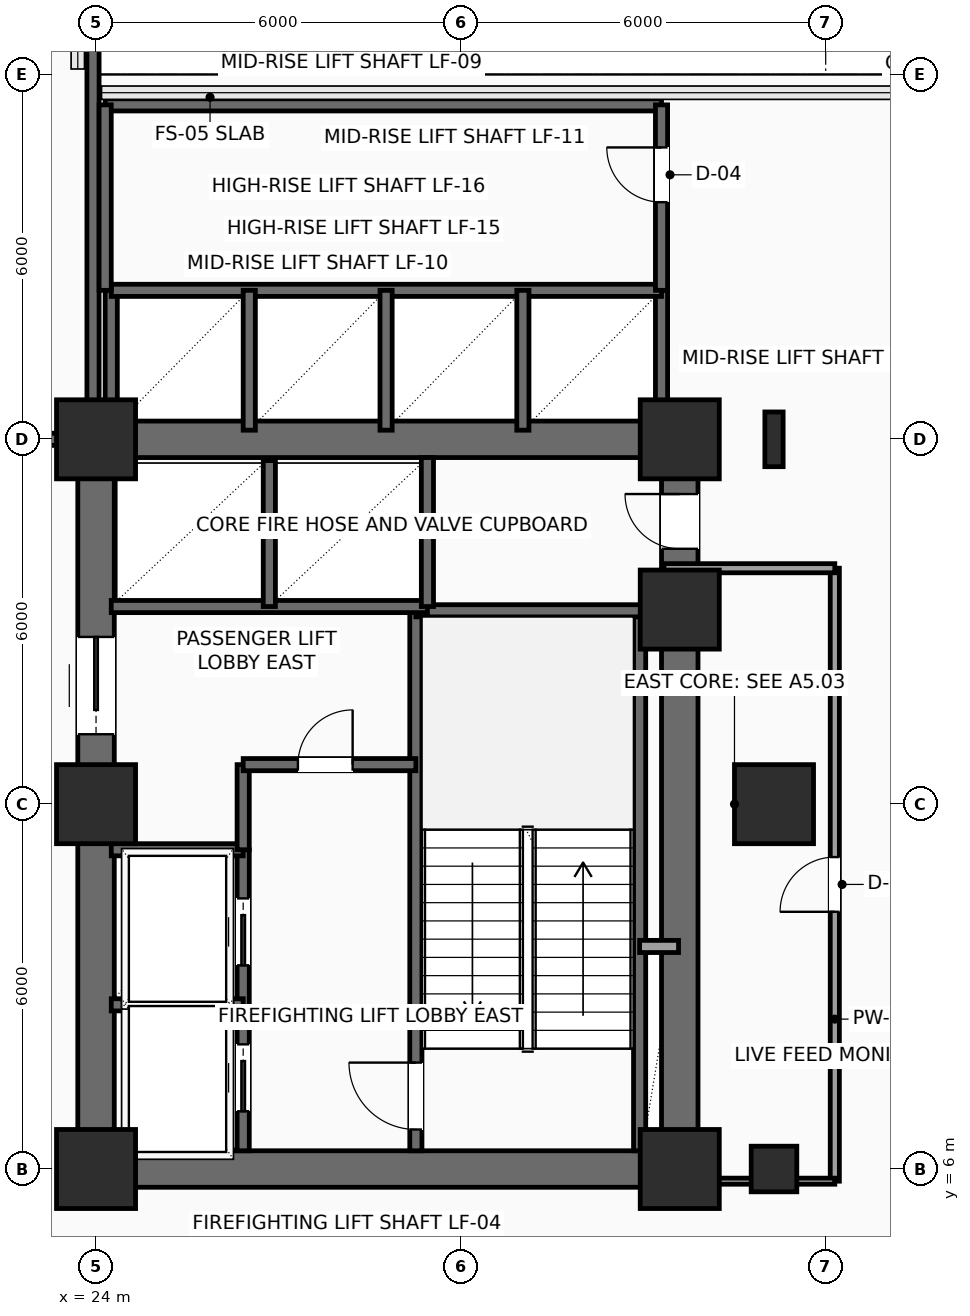
"""IFC4 building model, lengths in metres.
Left out: names, types, materials, properties, quantities, classifications, styles, units other than length and angle.
Written with IfcOpenShell. Run it as: python <this file> out.ifc"""

import sys

from ifc_helpers import new_model, si_unit, direction, frame, frame_2d, origin, origin_2d, place, context, subcontext, project, spatial, rectangle, hollow_rectangle, i_section, extrude, element, fill, save


model = new_model("IFC4")
c1 = context("Model", 3, precision=1e-05, world=origin(), true_north=direction((0.0, 1.0)))
c2 = subcontext(c1, "Body", "Model", "MODEL_VIEW")
j1 = project(units=[si_unit("LENGTHUNIT", "METRE"), si_unit("PLANEANGLEUNIT", "RADIAN")], contexts=[c1])
p1 = place(None, origin())
s1 = spatial("IfcSite", under=j1, at=p1, CompositionType="ELEMENT")
p2 = place(p1, origin())
s2 = spatial("IfcBuilding", under=s1, at=p2, CompositionType="ELEMENT")
p3 = place(p2, frame((0.0, 0.0, 40.2)))
s3 = spatial("IfcBuildingStorey", under=s2, at=p3, CompositionType="ELEMENT", Elevation=40.2)
for number, where, z_axis, x_axis in (
    (1, (24.0, 6.0, 0.0), (0.0, 0.0, 1.0), (1.0, 0.0, 0.0)),
    (2, (24.0, 12.0, 0.0), (0.0, 0.0, 1.0), (1.0, 0.0, 0.0)),
    (3, (24.0, 18.0, 0.0), (0.0, 0.0, 1.0), (1.0, 0.0, 0.0)),
    (4, (33.6, 6.0, 0.0), (0.0, 0.0, 1.0), (1.0, 0.0, 0.0)),
    (5, (33.6, 15.2, 0.0), (0.0, 0.0, 1.0), (1.0, 0.0, 0.0)),
    (6, (33.6, 18.0, 0.0), (0.0, 0.0, 1.0), (1.0, 0.0, 0.0)),
):
    element("IfcColumn", number, at=place(p3, frame(where, z_axis=z_axis, x_axis=x_axis)), inside=s3, PredefinedType="COLUMN", context=c2, shape_type="SweptSolid", body=[
        extrude(rectangle(XDim=1.3, YDim=1.3, at=origin_2d()), origin(), (0.0, 0.0, 1.0), 3.9),
    ])
p4 = place(p3, frame((35.15, 6.0, 0.0), z_axis=(0.0, 0.0, 1.0), x_axis=(1.0, 0.0, 0.0)))
e7 = element("IfcColumn", 7, at=p4, inside=s3, PredefinedType="COLUMN", context=c2, shape_type="SweptSolid", body=[
    extrude(hollow_rectangle(XDim=0.75, YDim=0.75, WallThickness=0.035, InnerFilletRadius=0.035, OuterFilletRadius=0.05, at=origin_2d()), origin(), (0.0, 0.0, 1.0), 3.9),
])
p5 = place(p3, frame((35.15, 12.0, 0.0), z_axis=(0.0, 0.0, 1.0), x_axis=(1.0, 0.0, 0.0)))
e8 = element("IfcColumn", 8, at=p5, inside=s3, PredefinedType="COLUMN", context=c2, shape_type="SweptSolid", body=[
    extrude(rectangle(XDim=1.3, YDim=1.3, at=origin_2d()), origin(), (0.0, 0.0, 1.0), 3.9),
])
p6 = place(p3, frame((35.15, 18.0, 0.0), z_axis=(0.0, 0.0, 1.0), x_axis=(1.0, 0.0, 0.0)))
e9 = element("IfcColumn", 9, at=p6, inside=s3, PredefinedType="COLUMN", context=c2, shape_type="SweptSolid", body=[
    extrude(i_section(OverallWidth=0.3, OverallDepth=0.9, WebThickness=0.019, FlangeThickness=0.035, FilletRadius=0.03, at=origin_2d()), origin(), (0.0, 0.0, 1.0), 3.9),
])
for number, where, z_axis, x_axis in (
    (10, (24.0, 6.0, 0.0), (0.0, 0.0, 1.0), (1.0, 0.0, 0.0)),
    (11, (24.0, 18.0, 0.0), (0.0, 0.0, 1.0), (1.0, 0.0, 0.0)),
):
    element("IfcWall", number, at=place(p3, frame(where, z_axis=z_axis, x_axis=x_axis)), inside=s3, PredefinedType="SHEAR", context=c2, shape_type="SweptSolid", body=[
        extrude(rectangle(XDim=9.6, YDim=0.6, at=frame_2d((4.8, 0.0))), origin(), (0.0, 0.0, 1.0), 3.65),
    ])
p7 = place(p3, frame((24.0, 6.0, 0.0), z_axis=(0.0, 0.0, 1.0), x_axis=(0.0, 1.0, 0.0)))
e12 = element("IfcWall", 12, at=p7, inside=s3, PredefinedType="SHEAR", context=c2, shape_type="SweptSolid", body=[
    extrude(rectangle(XDim=12.0, YDim=0.6, at=frame_2d((6.0, 0.0))), origin(), (0.0, 0.0, 1.0), 3.65),
])
p8 = place(p7, frame((7.15, 0.0, 0.0)))
e13 = element("IfcOpeningElement", 13, at=p8, cuts=e12, PredefinedType="OPENING", context=c2, shape_type="SweptSolid", body=[
    extrude(rectangle(XDim=1.6, YDim=2.3, at=frame_2d((0.8, 1.15))), frame((0.0, 0.31, 0.0), z_axis=(0.0, -1.0, 0.0), x_axis=(1.0, 0.0, 0.0)), (0.0, 0.0, 1.0), 0.62),
])
p9 = place(p3, frame((33.6, 6.0, 0.0), z_axis=(0.0, 0.0, 1.0), x_axis=(0.0, 1.0, 0.0)))
e14 = element("IfcWall", 14, at=p9, inside=s3, PredefinedType="SHEAR", context=c2, shape_type="SweptSolid", body=[
    extrude(rectangle(XDim=12.0, YDim=0.6, at=frame_2d((6.0, 0.0))), origin(), (0.0, 0.0, 1.0), 3.65),
])
p10 = place(p9, frame((10.2, 0.0, 0.0)))
e15 = element("IfcOpeningElement", 15, at=p10, cuts=e14, PredefinedType="OPENING", context=c2, shape_type="SweptSolid", body=[
    extrude(rectangle(XDim=0.9, YDim=2.15, at=frame_2d((0.45, 1.075))), frame((0.0, 0.31, 0.0), z_axis=(0.0, -1.0, 0.0), x_axis=(1.0, 0.0, 0.0)), (0.0, 0.0, 1.0), 0.62),
])
p11 = place(p3, frame((29.26, 6.3, 0.0), z_axis=(0.0, 0.0, 1.0), x_axis=(0.0, 1.0, 0.0)))
e16 = element("IfcWall", 16, at=p11, inside=s3, PredefinedType="SHEAR", context=c2, shape_type="SweptSolid", body=[
    extrude(rectangle(XDim=8.88, YDim=0.2, at=frame_2d((4.44, 0.0))), origin(), (0.0, 0.0, 1.0), 3.65),
])
p12 = place(p11, frame((0.35, 0.0, 0.0)))
e17 = element("IfcOpeningElement", 17, at=p12, cuts=e16, PredefinedType="OPENING", context=c2, shape_type="SweptSolid", body=[
    extrude(rectangle(XDim=1.1, YDim=2.2, at=frame_2d((0.55, 1.1))), frame((0.0, 0.11, 0.0), z_axis=(0.0, -1.0, 0.0), x_axis=(1.0, 0.0, 0.0)), (0.0, 0.0, 1.0), 0.22),
])
p13 = place(p3, frame((32.94, 6.3, 0.0), z_axis=(0.0, 0.0, 1.0), x_axis=(0.0, 1.0, 0.0)))
e18 = element("IfcWall", 18, at=p13, inside=s3, PredefinedType="SHEAR", context=c2, shape_type="SweptSolid", body=[
    extrude(rectangle(XDim=8.88, YDim=0.2, at=frame_2d((4.44, 0.0))), origin(), (0.0, 0.0, 1.0), 3.65),
])
p14 = place(p3, frame((29.26, 15.18, 0.0), z_axis=(0.0, 0.0, 1.0), x_axis=(1.0, 0.0, 0.0)))
e19 = element("IfcWall", 19, at=p14, inside=s3, PredefinedType="SHEAR", context=c2, shape_type="SweptSolid", body=[
    extrude(rectangle(XDim=4.04, YDim=0.2, at=frame_2d((2.02, 0.0))), origin(), (0.0, 0.0, 1.0), 3.65),
])
p15 = place(p3, frame((26.42, 6.3, 0.0), z_axis=(0.0, 0.0, 1.0), x_axis=(0.0, 1.0, 0.0)))
e20 = element("IfcWall", 20, at=p15, inside=s3, PredefinedType="SHEAR", context=c2, shape_type="SweptSolid", body=[
    extrude(rectangle(XDim=4.95, YDim=0.2, at=frame_2d((2.475, 0.0))), origin(), (0.0, 0.0, 1.0), 3.65),
])
p16 = place(p15, frame((0.65, 0.0, 0.0)))
e21 = element("IfcOpeningElement", 21, at=p16, cuts=e20, PredefinedType="OPENING", context=c2, shape_type="SweptSolid", body=[
    extrude(rectangle(XDim=1.1, YDim=2.2, at=frame_2d((0.55, 1.1))), frame((0.0, 0.11, 0.0), z_axis=(0.0, -1.0, 0.0), x_axis=(1.0, 0.0, 0.0)), (0.0, 0.0, 1.0), 0.22),
])
p17 = place(p15, frame((3.05, 0.0, 0.0)))
e22 = element("IfcOpeningElement", 22, at=p17, cuts=e20, PredefinedType="OPENING", context=c2, shape_type="SweptSolid", body=[
    extrude(rectangle(XDim=1.1, YDim=2.2, at=frame_2d((0.55, 1.1))), frame((0.0, 0.11, 0.0), z_axis=(0.0, -1.0, 0.0), x_axis=(1.0, 0.0, 0.0)), (0.0, 0.0, 1.0), 0.22),
])
for number, where, z_axis, x_axis in (
    (23, (24.25, 8.7, 0.0), (0.0, 0.0, 1.0), (1.0, 0.0, 0.0)),
    (24, (24.25, 11.25, 0.0), (0.0, 0.0, 1.0), (1.0, 0.0, 0.0)),
):
    element("IfcWall", number, at=place(p3, frame(where, z_axis=z_axis, x_axis=x_axis)), inside=s3, PredefinedType="SHEAR", context=c2, shape_type="SweptSolid", body=[
        extrude(rectangle(XDim=2.17, YDim=0.2, at=frame_2d((1.085, 0.0))), origin(), (0.0, 0.0, 1.0), 3.65),
    ])
p18 = place(p3, frame((26.42, 11.25, 0.0), z_axis=(0.0, 0.0, 1.0), x_axis=(0.0, 1.0, 0.0)))
e25 = element("IfcWall", 25, at=p18, inside=s3, PredefinedType="SHEAR", context=c2, shape_type="SweptSolid", body=[
    extrude(rectangle(XDim=1.4, YDim=0.2, at=frame_2d((0.7, 0.0))), origin(), (0.0, 0.0, 1.0), 3.65),
])
p19 = place(p3, frame((26.42, 12.65, 0.0), z_axis=(0.0, 0.0, 1.0), x_axis=(1.0, 0.0, 0.0)))
e26 = element("IfcWall", 26, at=p19, inside=s3, PredefinedType="SHEAR", context=c2, shape_type="SweptSolid", body=[
    extrude(rectangle(XDim=2.84, YDim=0.2, at=frame_2d((1.42, 0.0))), origin(), (0.0, 0.0, 1.0), 3.65),
])
p20 = place(p19, frame((0.9, 0.0, 0.0)))
e27 = element("IfcOpeningElement", 27, at=p20, cuts=e26, PredefinedType="OPENING", context=c2, shape_type="SweptSolid", body=[
    extrude(rectangle(XDim=0.9, YDim=2.15, at=frame_2d((0.45, 1.075))), frame((0.0, 0.11, 0.0), z_axis=(0.0, -1.0, 0.0), x_axis=(1.0, 0.0, 0.0)), (0.0, 0.0, 1.0), 0.22),
])
p21 = place(p3, frame((32.94, 9.66, 0.0), z_axis=(0.0, 0.0, 1.0), x_axis=(1.0, 0.0, 0.0)))
e28 = element("IfcWall", 28, at=p21, inside=s3, PredefinedType="SOLIDWALL", context=c2, shape_type="SweptSolid", body=[
    extrude(rectangle(XDim=0.64, YDim=0.2, at=frame_2d((0.32, 0.0))), origin(), (0.0, 0.0, 1.0), 3.65),
])
p22 = place(p3, frame((24.25, 15.25, 0.0), z_axis=(0.0, 0.0, 1.0), x_axis=(1.0, 0.0, 0.0)))
e29 = element("IfcWall", 29, at=p22, inside=s3, PredefinedType="SHEAR", context=c2, shape_type="SweptSolid", body=[
    extrude(rectangle(XDim=5.2, YDim=0.2, at=frame_2d((2.6, 0.0))), origin(), (0.0, 0.0, 1.0), 3.65),
])
p23 = place(p3, frame((26.85, 15.25, 0.0), z_axis=(0.0, 0.0, 1.0), x_axis=(0.0, 1.0, 0.0)))
e30 = element("IfcWall", 30, at=p23, inside=s3, PredefinedType="SHEAR", context=c2, shape_type="SweptSolid", body=[
    extrude(rectangle(XDim=2.4, YDim=0.2, at=frame_2d((1.2, 0.0))), origin(), (0.0, 0.0, 1.0), 3.65),
])
p24 = place(p3, frame((29.45, 15.25, 0.0), z_axis=(0.0, 0.0, 1.0), x_axis=(0.0, 1.0, 0.0)))
e31 = element("IfcWall", 31, at=p24, inside=s3, PredefinedType="SHEAR", context=c2, shape_type="SweptSolid", body=[
    extrude(rectangle(XDim=2.45, YDim=0.2, at=frame_2d((1.225, 0.0))), origin(), (0.0, 0.0, 1.0), 3.65),
])
p25 = place(p3, frame((20.45, 18.0, 0.0), z_axis=(0.0, 0.0, 1.0), x_axis=(1.0, 0.0, 0.0)))
e32 = element("IfcWall", 32, at=p25, inside=s3, PredefinedType="SHEAR", context=c2, shape_type="SweptSolid", body=[
    extrude(rectangle(XDim=3.5, YDim=0.2, at=frame_2d((1.75, 0.0))), origin(), (0.0, 0.0, 1.0), 3.65),
])
p26 = place(p25, frame((0.95, 0.0, 0.0)))
e33 = element("IfcOpeningElement", 33, at=p26, cuts=e32, PredefinedType="OPENING", context=c2, shape_type="SweptSolid", body=[
    extrude(rectangle(XDim=1.6, YDim=2.3, at=frame_2d((0.8, 1.15))), frame((0.0, 0.11, 0.0), z_axis=(0.0, -1.0, 0.0), x_axis=(1.0, 0.0, 0.0)), (0.0, 0.0, 1.0), 0.22),
])
p27 = place(p3, frame((23.95, 18.0, 0.0), z_axis=(0.0, 0.0, 1.0), x_axis=(0.0, 1.0, 0.0)))
e34 = element("IfcWall", 34, at=p27, inside=s3, PredefinedType="SHEAR", context=c2, shape_type="SweptSolid", body=[
    extrude(rectangle(XDim=9.3, YDim=0.2, at=frame_2d((4.65, 0.0))), origin(), (0.0, 0.0, 1.0), 3.65),
])
for number, where, z_axis, x_axis in (
    (35, (33.3, 18.1, 0.0), (0.0, 0.0, 1.0), (0.0, 1.0, 0.0)),
    (36, (24.25, 18.1, 0.0), (0.0, 0.0, 1.0), (0.0, 1.0, 0.0)),
):
    element("IfcWall", number, at=place(p3, frame(where, z_axis=z_axis, x_axis=x_axis)), inside=s3, PredefinedType="SHEAR", context=c2, shape_type="SweptSolid", body=[
        extrude(rectangle(XDim=2.35, YDim=0.2, at=frame_2d((1.175, 0.0))), origin(), (0.0, 0.0, 1.0), 3.65),
    ])
p28 = place(p3, frame((24.25, 20.45, 0.0), z_axis=(0.0, 0.0, 1.0), x_axis=(1.0, 0.0, 0.0)))
e37 = element("IfcWall", 37, at=p28, inside=s3, PredefinedType="SHEAR", context=c2, shape_type="SweptSolid", body=[
    extrude(rectangle(XDim=9.05, YDim=0.2, at=frame_2d((4.525, 0.0))), origin(), (0.0, 0.0, 1.0), 3.65),
])
for number, where, z_axis, x_axis in (
    (38, (26.52, 18.15, 0.0), (0.0, 0.0, 1.0), (0.0, 1.0, 0.0)),
    (39, (28.77, 18.15, 0.0), (0.0, 0.0, 1.0), (0.0, 1.0, 0.0)),
    (40, (31.02, 18.15, 0.0), (0.0, 0.0, 1.0), (0.0, 1.0, 0.0)),
):
    element("IfcWall", number, at=place(p3, frame(where, z_axis=z_axis, x_axis=x_axis)), inside=s3, PredefinedType="SHEAR", context=c2, shape_type="SweptSolid", body=[
        extrude(rectangle(XDim=2.3, YDim=0.2, at=frame_2d((1.15, 0.0))), origin(), (0.0, 0.0, 1.0), 3.65),
    ])
p29 = place(p3, frame((24.15, 23.5, 0.0), z_axis=(0.0, 0.0, 1.0), x_axis=(1.0, 0.0, 0.0)))
e41 = element("IfcWall", 41, at=p29, inside=s3, PredefinedType="SHEAR", context=c2, shape_type="SweptSolid", body=[
    extrude(rectangle(XDim=9.15, YDim=0.2, at=frame_2d((4.575, 0.0))), origin(), (0.0, 0.0, 1.0), 3.65),
])
p30 = place(p3, frame((33.3, 20.45, 0.0), z_axis=(0.0, 0.0, 1.0), x_axis=(0.0, 1.0, 0.0)))
e42 = element("IfcWall", 42, at=p30, inside=s3, PredefinedType="SHEAR", context=c2, shape_type="SweptSolid", body=[
    extrude(rectangle(XDim=3.05, YDim=0.2, at=frame_2d((1.525, 0.0))), origin(), (0.0, 0.0, 1.0), 3.65),
])
p31 = place(p30, frame((1.45, 0.0, 0.0)))
e43 = element("IfcOpeningElement", 43, at=p31, cuts=e42, PredefinedType="OPENING", context=c2, shape_type="SweptSolid", body=[
    extrude(rectangle(XDim=0.9, YDim=2.15, at=frame_2d((0.45, 1.075))), frame((0.0, 0.11, 0.0), z_axis=(0.0, -1.0, 0.0), x_axis=(1.0, 0.0, 0.0)), (0.0, 0.0, 1.0), 0.22),
])
p32 = place(p3, frame((24.15, 20.45, 0.0), z_axis=(0.0, 0.0, 1.0), x_axis=(0.0, 1.0, 0.0)))
e44 = element("IfcWall", 44, at=p32, inside=s3, PredefinedType="SHEAR", context=c2, shape_type="SweptSolid", body=[
    extrude(rectangle(XDim=3.05, YDim=0.2, at=frame_2d((1.525, 0.0))), origin(), (0.0, 0.0, 1.0), 3.65),
])
p33 = place(p3, frame((36.15, 5.8, 0.0), z_axis=(0.0, 0.0, 1.0), x_axis=(0.0, 1.0, 0.0)))
e45 = element("IfcWall", 45, at=p33, inside=s3, PredefinedType="PARTITIONING", context=c2, shape_type="SweptSolid", body=[
    extrude(rectangle(XDim=10.08, YDim=0.15, at=frame_2d((5.04, 0.0))), origin(), (0.0, 0.0, 1.0), 3.65),
])
p34 = place(p33, frame((4.43, 0.0, 0.0)))
e46 = element("IfcOpeningElement", 46, at=p34, cuts=e45, PredefinedType="OPENING", context=c2, shape_type="SweptSolid", body=[
    extrude(rectangle(XDim=0.9, YDim=2.1, at=frame_2d((0.45, 1.05))), frame((0.0, 0.085, 0.0), z_axis=(0.0, -1.0, 0.0), x_axis=(1.0, 0.0, 0.0)), (0.0, 0.0, 1.0), 0.17),
])
p35 = place(p3, frame((36.15, 15.88, 0.0), z_axis=(0.0, 0.0, 1.0), x_axis=(-1.0, 0.0, 0.0)))
e47 = element("IfcWall", 47, at=p35, inside=s3, PredefinedType="PARTITIONING", context=c2, shape_type="SweptSolid", body=[
    extrude(rectangle(XDim=2.81, YDim=0.15, at=frame_2d((1.405, 0.0))), origin(), (0.0, 0.0, 1.0), 3.65),
])
p36 = place(p3, frame((33.65, 5.8, 0.0), z_axis=(0.0, 0.0, 1.0), x_axis=(1.0, 0.0, 0.0)))
e48 = element("IfcWall", 48, at=p36, inside=s3, PredefinedType="PARTITIONING", context=c2, shape_type="SweptSolid", body=[
    extrude(rectangle(XDim=2.5, YDim=0.1, at=frame_2d((1.25, 0.0))), origin(), (0.0, 0.0, 1.0), 2.992),
])
p37 = place(p8, origin())
e49 = element("IfcDoor", 49, at=p37, inside=s3, OperationType="DOUBLE_DOOR_SLIDING", PredefinedType="DOOR", context=c2, shape_type="SweptSolid", body=[
    extrude(rectangle(XDim=1.6, YDim=2.3, at=frame_2d((0.8, 1.15))), frame((0.0, 0.025, 0.0), z_axis=(0.0, -1.0, 0.0), x_axis=(1.0, 0.0, 0.0)), (0.0, 0.0, 1.0), 0.05),
])
fill(e13, e49)
p38 = place(p10, origin())
e50 = element("IfcDoor", 50, at=p38, inside=s3, OperationType="SINGLE_SWING_RIGHT", PredefinedType="DOOR", context=c2, shape_type="SweptSolid", body=[
    extrude(rectangle(XDim=0.9, YDim=2.15, at=frame_2d((0.45, 1.075))), frame((0.0, 0.025, 0.0), z_axis=(0.0, -1.0, 0.0), x_axis=(1.0, 0.0, 0.0)), (0.0, 0.0, 1.0), 0.05),
])
fill(e15, e50)
p39 = place(p12, origin())
e51 = element("IfcDoor", 51, at=p39, inside=s3, OperationType="SINGLE_SWING_RIGHT", PredefinedType="DOOR", context=c2, shape_type="SweptSolid", body=[
    extrude(rectangle(XDim=1.1, YDim=2.2, at=frame_2d((0.55, 1.1))), frame((0.0, 0.025, 0.0), z_axis=(0.0, -1.0, 0.0), x_axis=(1.0, 0.0, 0.0)), (0.0, 0.0, 1.0), 0.05),
])
fill(e17, e51)
p40 = place(p16, origin())
e52 = element("IfcDoor", 52, at=p40, inside=s3, OperationType="SLIDING_TO_LEFT", PredefinedType="DOOR", context=c2, shape_type="SweptSolid", body=[
    extrude(rectangle(XDim=1.1, YDim=2.2, at=frame_2d((0.55, 1.1))), frame((0.0, 0.025, 0.0), z_axis=(0.0, -1.0, 0.0), x_axis=(1.0, 0.0, 0.0)), (0.0, 0.0, 1.0), 0.05),
])
fill(e21, e52)
p41 = place(p17, origin())
e53 = element("IfcDoor", 53, at=p41, inside=s3, OperationType="SLIDING_TO_LEFT", PredefinedType="DOOR", context=c2, shape_type="SweptSolid", body=[
    extrude(rectangle(XDim=1.1, YDim=2.2, at=frame_2d((0.55, 1.1))), frame((0.0, 0.025, 0.0), z_axis=(0.0, -1.0, 0.0), x_axis=(1.0, 0.0, 0.0)), (0.0, 0.0, 1.0), 0.05),
])
fill(e22, e53)
p42 = place(p20, origin())
e54 = element("IfcDoor", 54, at=p42, inside=s3, OperationType="SINGLE_SWING_RIGHT", PredefinedType="DOOR", context=c2, shape_type="SweptSolid", body=[
    extrude(rectangle(XDim=0.9, YDim=2.15, at=frame_2d((0.45, 1.075))), frame((0.0, 0.025, 0.0), z_axis=(0.0, -1.0, 0.0), x_axis=(1.0, 0.0, 0.0)), (0.0, 0.0, 1.0), 0.05),
])
fill(e27, e54)
p43 = place(p31, origin())
e55 = element("IfcDoor", 55, at=p43, inside=s3, OperationType="SINGLE_SWING_RIGHT", PredefinedType="DOOR", context=c2, shape_type="SweptSolid", body=[
    extrude(rectangle(XDim=0.9, YDim=2.15, at=frame_2d((0.45, 1.075))), frame((0.0, 0.025, 0.0), z_axis=(0.0, -1.0, 0.0), x_axis=(1.0, 0.0, 0.0)), (0.0, 0.0, 1.0), 0.05),
])
fill(e43, e55)
p44 = place(p34, origin())
e56 = element("IfcDoor", 56, at=p44, inside=s3, OperationType="SINGLE_SWING_LEFT", PredefinedType="DOOR", context=c2, shape_type="SweptSolid", body=[
    extrude(rectangle(XDim=0.9, YDim=2.1, at=frame_2d((0.45, 1.05))), frame((0.0, 0.025, 0.0), z_axis=(0.0, -1.0, 0.0), x_axis=(1.0, 0.0, 0.0)), (0.0, 0.0, 1.0), 0.05),
])
fill(e46, e56)
save(model, sys.argv[1])
